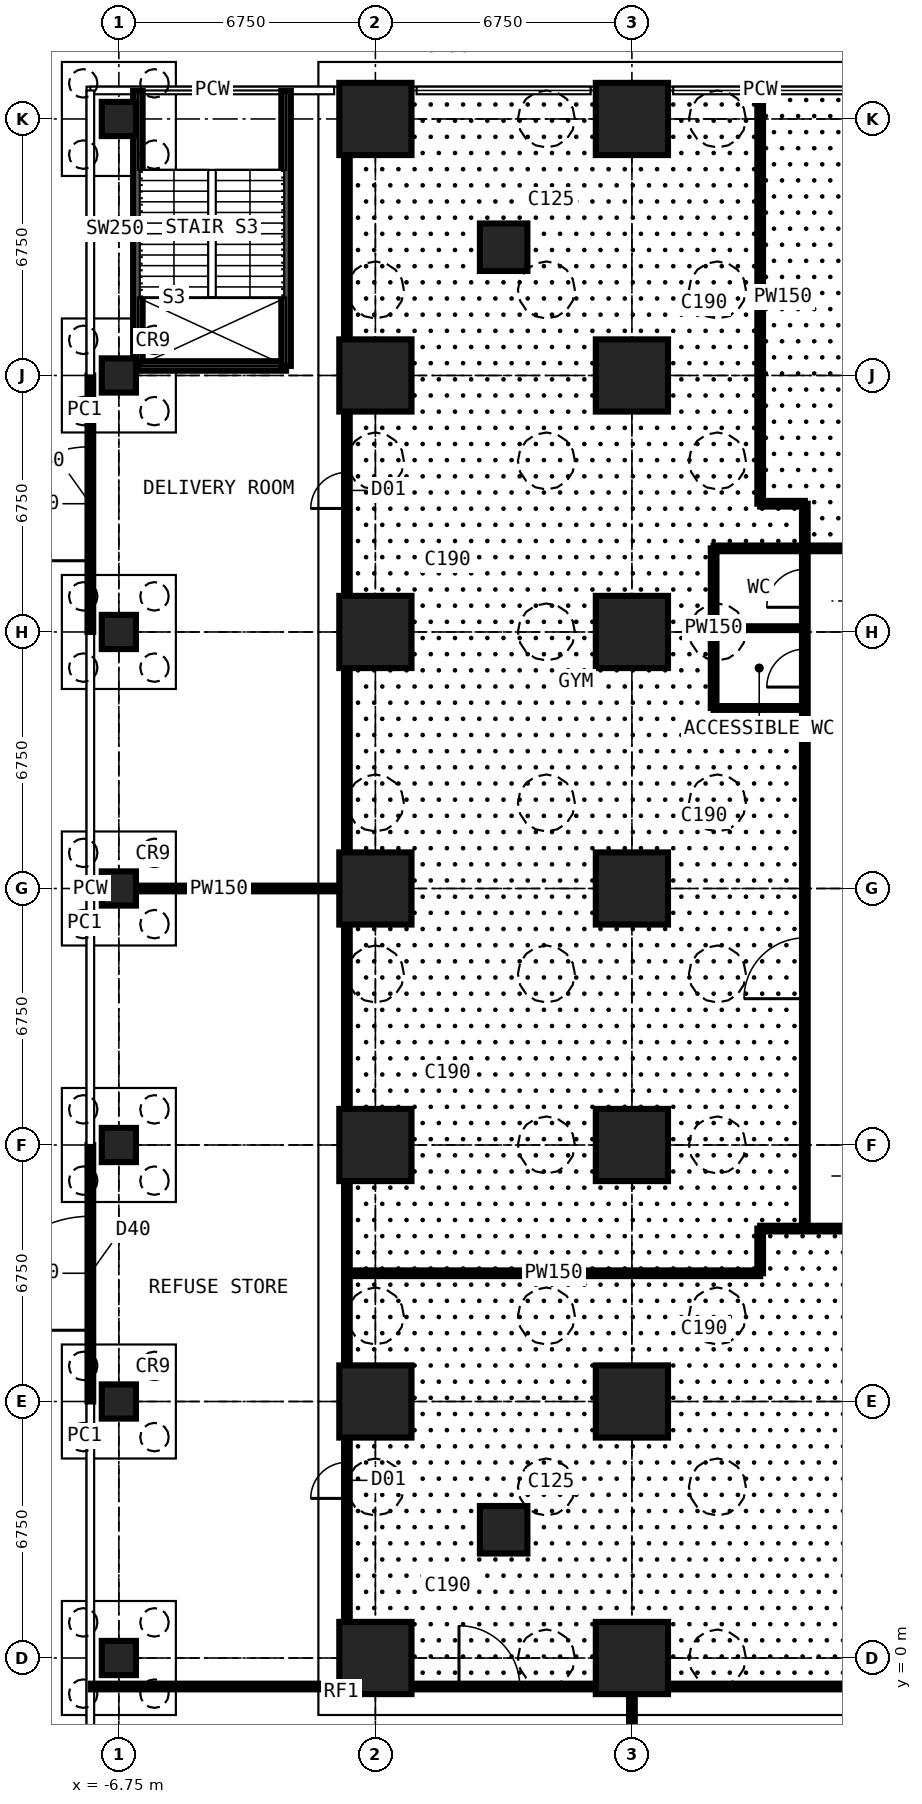
"""IFC4 building model, lengths in metres.
Left out: names, types, materials, properties, quantities, classifications, styles, units other than length and angle.
Written with IfcOpenShell. Run it as: python <this file> out.ifc"""

import sys

from ifc_helpers import new_model, si_unit, direction, frame, frame_2d, origin, origin_2d, place, context, subcontext, project, spatial, rectangle, circle, extrude, element, fill, save


model = new_model("IFC4")
c1 = context("Model", 3, precision=1e-05, world=origin(), true_north=direction((0.0, 1.0)))
c2 = subcontext(c1, "Body", "Model", "MODEL_VIEW")
j1 = project(units=[si_unit("LENGTHUNIT", "METRE"), si_unit("PLANEANGLEUNIT", "RADIAN")], contexts=[c1])
p1 = place(None, origin())
s1 = spatial("IfcSite", under=j1, at=p1, CompositionType="ELEMENT")
p2 = place(p1, origin())
s2 = spatial("IfcBuilding", under=s1, at=p2, CompositionType="ELEMENT")
p3 = place(p2, origin())
s3 = spatial("IfcBuildingStorey", under=s2, at=p3, CompositionType="ELEMENT", Elevation=0.0)
for number, where, z_axis, x_axis in (
    (1, (-6.75, 0.0, 0.0), (0.0, 0.0, 1.0), (1.0, 0.0, 0.0)),
    (2, (-6.75, 6.75, 0.0), (0.0, 0.0, 1.0), (1.0, 0.0, 0.0)),
    (3, (-6.75, 13.5, 0.0), (0.0, 0.0, 1.0), (1.0, 0.0, 0.0)),
    (4, (-6.75, 20.25, 0.0), (0.0, 0.0, 1.0), (1.0, 0.0, 0.0)),
    (5, (-6.75, 27.0, 0.0), (0.0, 0.0, 1.0), (1.0, 0.0, 0.0)),
    (6, (-6.75, 33.75, 0.0), (0.0, 0.0, 1.0), (1.0, 0.0, 0.0)),
    (7, (-6.75, 40.5, 0.0), (0.0, 0.0, 1.0), (1.0, 0.0, 0.0)),
):
    element("IfcColumn", number, at=place(p3, frame(where, z_axis=z_axis, x_axis=x_axis)), inside=s3, PredefinedType="COLUMN", context=c2, shape_type="SweptSolid", body=[
        extrude(circle(Radius=0.45, at=origin_2d()), origin(), (0.0, 0.0, 1.0), 4.5),
    ])
for number, where, z_axis, x_axis in (
    (8, (0.0, 0.0, 0.0), (0.0, 0.0, 1.0), (1.0, 0.0, 0.0)),
    (9, (0.0, 6.75, 0.0), (0.0, 0.0, 1.0), (1.0, 0.0, 0.0)),
    (10, (0.0, 13.5, 0.0), (0.0, 0.0, 1.0), (1.0, 0.0, 0.0)),
    (11, (0.0, 20.25, 0.0), (0.0, 0.0, 1.0), (1.0, 0.0, 0.0)),
    (12, (0.0, 27.0, 0.0), (0.0, 0.0, 1.0), (1.0, 0.0, 0.0)),
    (13, (0.0, 33.75, 0.0), (0.0, 0.0, 1.0), (1.0, 0.0, 0.0)),
    (14, (0.0, 40.5, 0.0), (0.0, 0.0, 1.0), (1.0, 0.0, 0.0)),
):
    element("IfcColumn", number, at=place(p3, frame(where, z_axis=z_axis, x_axis=x_axis)), inside=s3, PredefinedType="COLUMN", context=c2, shape_type="SweptSolid", body=[
        extrude(rectangle(XDim=1.9, YDim=1.9, at=origin_2d()), origin(), (0.0, 0.0, 1.0), 4.5),
    ])
for number, where, z_axis, x_axis in (
    (15, (3.375, 3.375, 0.0), (0.0, 0.0, 1.0), (1.0, 0.0, 0.0)),
    (16, (3.375, 37.125, 0.0), (0.0, 0.0, 1.0), (1.0, 0.0, 0.0)),
):
    element("IfcColumn", number, at=place(p3, frame(where, z_axis=z_axis, x_axis=x_axis)), inside=s3, PredefinedType="COLUMN", context=c2, shape_type="SweptSolid", body=[
        extrude(rectangle(XDim=1.25, YDim=1.25, at=origin_2d()), origin(), (0.0, 0.0, 1.0), 4.5),
    ])
for number, where, z_axis, x_axis in (
    (17, (6.75, 0.0, 0.0), (0.0, 0.0, 1.0), (1.0, 0.0, 0.0)),
    (18, (6.75, 6.75, 0.0), (0.0, 0.0, 1.0), (1.0, 0.0, 0.0)),
    (19, (6.75, 13.5, 0.0), (0.0, 0.0, 1.0), (1.0, 0.0, 0.0)),
    (20, (6.75, 20.25, 0.0), (0.0, 0.0, 1.0), (1.0, 0.0, 0.0)),
    (21, (6.75, 27.0, 0.0), (0.0, 0.0, 1.0), (1.0, 0.0, 0.0)),
    (22, (6.75, 33.75, 0.0), (0.0, 0.0, 1.0), (1.0, 0.0, 0.0)),
    (23, (6.75, 40.5, 0.0), (0.0, 0.0, 1.0), (1.0, 0.0, 0.0)),
):
    element("IfcColumn", number, at=place(p3, frame(where, z_axis=z_axis, x_axis=x_axis)), inside=s3, PredefinedType="COLUMN", context=c2, shape_type="SweptSolid", body=[
        extrude(rectangle(XDim=1.9, YDim=1.9, at=origin_2d()), origin(), (0.0, 0.0, 1.0), 4.5),
    ])
p4 = place(p3, frame((-7.5, 6.75, 0.0), z_axis=(0.0, 0.0, 1.0), x_axis=(0.0, 1.0, 0.0)))
e24 = element("IfcWall", 24, at=p4, inside=s3, PredefinedType="SOLIDWALL", context=c2, shape_type="SweptSolid", body=[
    extrude(rectangle(XDim=6.75, YDim=0.15, at=frame_2d((3.375, 0.0))), origin(), (0.0, 0.0, 1.0), 4.25),
])
p5 = place(p4, frame((1.875, 0.0, 0.0)))
e25 = element("IfcOpeningElement", 25, at=p5, cuts=e24, PredefinedType="OPENING", context=c2, shape_type="SweptSolid", body=[
    extrude(rectangle(XDim=3.0, YDim=3.0, at=frame_2d((1.5, 1.5))), frame((0.0, 0.085, 0.0), z_axis=(0.0, -1.0, 0.0), x_axis=(1.0, 0.0, 0.0)), (0.0, 0.0, 1.0), 0.17),
])
p6 = place(p3, frame((-7.5, 27.0, 0.0), z_axis=(0.0, 0.0, 1.0), x_axis=(0.0, 1.0, 0.0)))
e26 = element("IfcWall", 26, at=p6, inside=s3, PredefinedType="SOLIDWALL", context=c2, shape_type="SweptSolid", body=[
    extrude(rectangle(XDim=6.75, YDim=0.15, at=frame_2d((3.375, 0.0))), origin(), (0.0, 0.0, 1.0), 4.25),
])
p7 = place(p6, frame((1.875, 0.0, 0.0)))
e27 = element("IfcOpeningElement", 27, at=p7, cuts=e26, PredefinedType="OPENING", context=c2, shape_type="SweptSolid", body=[
    extrude(rectangle(XDim=3.0, YDim=3.0, at=frame_2d((1.5, 1.5))), frame((0.0, 0.085, 0.0), z_axis=(0.0, -1.0, 0.0), x_axis=(1.0, 0.0, 0.0)), (0.0, 0.0, 1.0), 0.17),
])
p8 = place(p3, frame((-7.484, -0.75, 0.0), z_axis=(0.0, 0.0, 1.0), x_axis=(1.0, 0.0, 0.0)))
e28 = element("IfcWall", 28, at=p8, inside=s3, PredefinedType="PARTITIONING", context=c2, shape_type="SweptSolid", body=[
    extrude(rectangle(XDim=20.984, YDim=0.15, at=frame_2d((10.492, 0.0))), origin(), (0.0, 0.0, 1.0), 4.25),
])
p9 = place(p8, frame((9.684, 0.0, 0.0)))
e29 = element("IfcOpeningElement", 29, at=p9, cuts=e28, PredefinedType="OPENING", context=c2, shape_type="SweptSolid", body=[
    extrude(rectangle(XDim=1.6, YDim=2.4, at=frame_2d((0.8, 1.2))), frame((0.0, 0.085, 0.0), z_axis=(0.0, -1.0, 0.0), x_axis=(1.0, 0.0, 0.0)), (0.0, 0.0, 1.0), 0.17),
])
p10 = place(p3, frame((-7.484, 20.25, 0.0), z_axis=(0.0, 0.0, 1.0), x_axis=(1.0, 0.0, 0.0)))
e30 = element("IfcWall", 30, at=p10, inside=s3, PredefinedType="PARTITIONING", context=c2, shape_type="SweptSolid", body=[
    extrude(rectangle(XDim=6.734, YDim=0.15, at=frame_2d((3.367, 0.0))), origin(), (0.0, 0.0, 1.0), 3.752),
])
p11 = place(p3, frame((-6.25, 34.0, 0.0), z_axis=(0.0, 0.0, 1.0), x_axis=(0.0, 1.0, 0.0)))
e31 = element("IfcWall", 31, at=p11, inside=s3, PredefinedType="SOLIDWALL", context=c2, shape_type="SweptSolid", body=[
    extrude(rectangle(XDim=7.234, YDim=0.25, at=frame_2d((3.617, 0.0))), origin(), (0.0, 0.0, 1.0), 4.25),
])
p12 = place(p3, frame((-6.25, 34.0, 0.0), z_axis=(0.0, 0.0, 1.0), x_axis=(1.0, 0.0, 0.0)))
e32 = element("IfcWall", 32, at=p12, inside=s3, PredefinedType="SOLIDWALL", context=c2, shape_type="SweptSolid", body=[
    extrude(rectangle(XDim=3.9, YDim=0.25, at=frame_2d((1.95, 0.0))), origin(), (0.0, 0.0, 1.0), 4.25),
])
p13 = place(p3, frame((-2.35, 34.0, 0.0), z_axis=(0.0, 0.0, 1.0), x_axis=(0.0, 1.0, 0.0)))
e33 = element("IfcWall", 33, at=p13, inside=s3, PredefinedType="SOLIDWALL", context=c2, shape_type="SweptSolid", body=[
    extrude(rectangle(XDim=7.234, YDim=0.25, at=frame_2d((3.617, 0.0))), origin(), (0.0, 0.0, 1.0), 4.25),
])
p14 = place(p3, frame((-0.75, -0.75, 0.0), z_axis=(0.0, 0.0, 1.0), x_axis=(0.0, 1.0, 0.0)))
e34 = element("IfcWall", 34, at=p14, inside=s3, PredefinedType="PARTITIONING", context=c2, shape_type="SweptSolid", body=[
    extrude(rectangle(XDim=41.984, YDim=0.15, at=frame_2d((20.992, 0.0))), origin(), (0.0, 0.0, 1.0), 4.25),
])
p15 = place(p14, frame((4.95, 0.0, 0.0)))
e35 = element("IfcOpeningElement", 35, at=p15, cuts=e34, PredefinedType="OPENING", context=c2, shape_type="SweptSolid", body=[
    extrude(rectangle(XDim=0.95, YDim=2.2, at=frame_2d((0.475, 1.1))), frame((0.0, 0.085, 0.0), z_axis=(0.0, -1.0, 0.0), x_axis=(1.0, 0.0, 0.0)), (0.0, 0.0, 1.0), 0.17),
])
p16 = place(p14, frame((31.0, 0.0, 0.0)))
e36 = element("IfcOpeningElement", 36, at=p16, cuts=e34, PredefinedType="OPENING", context=c2, shape_type="SweptSolid", body=[
    extrude(rectangle(XDim=0.95, YDim=2.2, at=frame_2d((0.475, 1.1))), frame((0.0, 0.085, 0.0), z_axis=(0.0, -1.0, 0.0), x_axis=(1.0, 0.0, 0.0)), (0.0, 0.0, 1.0), 0.17),
])
p17 = place(p3, frame((-0.75, 10.125, 0.0), z_axis=(0.0, 0.0, 1.0), x_axis=(1.0, 0.0, 0.0)))
e37 = element("IfcWall", 37, at=p17, inside=s3, PredefinedType="PARTITIONING", context=c2, shape_type="SweptSolid", body=[
    extrude(rectangle(XDim=10.875, YDim=0.15, at=frame_2d((5.438, 0.0))), origin(), (0.0, 0.0, 1.0), 4.25),
])
p18 = place(p3, frame((6.75, -7.6, 0.0), z_axis=(0.0, 0.0, 1.0), x_axis=(0.0, 1.0, 0.0)))
e38 = element("IfcWall", 38, at=p18, inside=s3, PredefinedType="PARTITIONING", context=c2, shape_type="SweptSolid", body=[
    extrude(rectangle(XDim=6.85, YDim=0.15, at=frame_2d((3.425, 0.0))), origin(), (0.0, 0.0, 1.0), 3.752),
])
p19 = place(p3, frame((8.9, 25.0, 0.0), z_axis=(0.0, 0.0, 1.0), x_axis=(0.0, 1.0, 0.0)))
e39 = element("IfcWall", 39, at=p19, inside=s3, PredefinedType="PARTITIONING", context=c2, shape_type="SweptSolid", body=[
    extrude(rectangle(XDim=4.2, YDim=0.15, at=frame_2d((2.1, 0.0))), origin(), (0.0, 0.0, 1.0), 4.25),
])
p20 = place(p3, frame((8.9, 25.0, 0.0), z_axis=(0.0, 0.0, 1.0), x_axis=(1.0, 0.0, 0.0)))
e40 = element("IfcWall", 40, at=p20, inside=s3, PredefinedType="PARTITIONING", context=c2, shape_type="SweptSolid", body=[
    extrude(rectangle(XDim=2.4, YDim=0.1, at=frame_2d((1.2, 0.0))), origin(), (0.0, 0.0, 1.0), 4.25),
])
p21 = place(p3, frame((8.9, 27.1, 0.0), z_axis=(0.0, 0.0, 1.0), x_axis=(1.0, 0.0, 0.0)))
e41 = element("IfcWall", 41, at=p21, inside=s3, PredefinedType="PARTITIONING", context=c2, shape_type="SweptSolid", body=[
    extrude(rectangle(XDim=2.4, YDim=0.1, at=frame_2d((1.2, 0.0))), origin(), (0.0, 0.0, 1.0), 3.752),
])
p22 = place(p3, frame((8.9, 29.2, 0.0), z_axis=(0.0, 0.0, 1.0), x_axis=(1.0, 0.0, 0.0)))
e42 = element("IfcWall", 42, at=p22, inside=s3, PredefinedType="PARTITIONING", context=c2, shape_type="SweptSolid", body=[
    extrude(rectangle(XDim=21.475, YDim=0.15, at=frame_2d((10.738, 0.0))), origin(), (0.0, 0.0, 1.0), 4.25),
])
p23 = place(p22, frame((10.55, 0.0, 0.0)))
e43 = element("IfcOpeningElement", 43, at=p23, cuts=e42, PredefinedType="OPENING", context=c2, shape_type="SweptSolid", body=[
    extrude(rectangle(XDim=1.6, YDim=2.4, at=frame_2d((0.8, 1.2))), frame((0.0, 0.085, 0.0), z_axis=(0.0, -1.0, 0.0), x_axis=(1.0, 0.0, 0.0)), (0.0, 0.0, 1.0), 0.17),
])
p24 = place(p3, frame((10.125, 10.125, 0.0), z_axis=(0.0, 0.0, 1.0), x_axis=(0.0, 1.0, 0.0)))
e44 = element("IfcWall", 44, at=p24, inside=s3, PredefinedType="PARTITIONING", context=c2, shape_type="SweptSolid", body=[
    extrude(rectangle(XDim=1.175, YDim=0.15, at=frame_2d((0.587, 0.0))), origin(), (0.0, 0.0, 1.0), 4.25),
])
p25 = place(p3, frame((10.125, 11.3, 0.0), z_axis=(0.0, 0.0, 1.0), x_axis=(1.0, 0.0, 0.0)))
e45 = element("IfcWall", 45, at=p25, inside=s3, PredefinedType="PARTITIONING", context=c2, shape_type="SweptSolid", body=[
    extrude(rectangle(XDim=20.675, YDim=0.15, at=frame_2d((10.337, 0.0))), origin(), (0.0, 0.0, 1.0), 4.25),
])
p26 = place(p25, frame((9.325, 0.0, 0.0)))
e46 = element("IfcOpeningElement", 46, at=p26, cuts=e45, PredefinedType="OPENING", context=c2, shape_type="SweptSolid", body=[
    extrude(rectangle(XDim=1.6, YDim=2.4, at=frame_2d((0.8, 1.2))), frame((0.0, 0.085, 0.0), z_axis=(0.0, -1.0, 0.0), x_axis=(1.0, 0.0, 0.0)), (0.0, 0.0, 1.0), 0.17),
])
p27 = place(p3, frame((10.125, 30.375, 0.0), z_axis=(0.0, 0.0, 1.0), x_axis=(0.0, 1.0, 0.0)))
e47 = element("IfcWall", 47, at=p27, inside=s3, PredefinedType="PARTITIONING", context=c2, shape_type="SweptSolid", body=[
    extrude(rectangle(XDim=10.859, YDim=0.15, at=frame_2d((5.429, 0.0))), origin(), (0.0, 0.0, 1.0), 4.25),
])
p28 = place(p3, frame((10.125, 30.375, 0.0), z_axis=(0.0, 0.0, 1.0), x_axis=(1.0, 0.0, 0.0)))
e48 = element("IfcWall", 48, at=p28, inside=s3, PredefinedType="PARTITIONING", context=c2, shape_type="SweptSolid", body=[
    extrude(rectangle(XDim=1.175, YDim=0.15, at=frame_2d((0.587, 0.0))), origin(), (0.0, 0.0, 1.0), 4.25),
])
p29 = place(p3, frame((11.3, 11.3, 0.0), z_axis=(0.0, 0.0, 1.0), x_axis=(0.0, 1.0, 0.0)))
e49 = element("IfcWall", 49, at=p29, inside=s3, PredefinedType="PARTITIONING", context=c2, shape_type="SweptSolid", body=[
    extrude(rectangle(XDim=19.075, YDim=0.15, at=frame_2d((9.538, 0.0))), origin(), (0.0, 0.0, 1.0), 4.25),
])
p30 = place(p29, frame((14.25, 0.0, 0.0)))
e50 = element("IfcOpeningElement", 50, at=p30, cuts=e49, PredefinedType="OPENING", context=c2, shape_type="SweptSolid", body=[
    extrude(rectangle(XDim=1.0, YDim=2.2, at=frame_2d((0.5, 1.1))), frame((0.0, 0.085, 0.0), z_axis=(0.0, -1.0, 0.0), x_axis=(1.0, 0.0, 0.0)), (0.0, 0.0, 1.0), 0.17),
])
p31 = place(p29, frame((16.35, 0.0, 0.0)))
e51 = element("IfcOpeningElement", 51, at=p31, cuts=e49, PredefinedType="OPENING", context=c2, shape_type="SweptSolid", body=[
    extrude(rectangle(XDim=1.0, YDim=2.2, at=frame_2d((0.5, 1.1))), frame((0.0, 0.085, 0.0), z_axis=(0.0, -1.0, 0.0), x_axis=(1.0, 0.0, 0.0)), (0.0, 0.0, 1.0), 0.17),
])
p32 = place(p29, frame((6.05, 0.0, 0.0)))
e52 = element("IfcOpeningElement", 52, at=p32, cuts=e49, PredefinedType="OPENING", context=c2, shape_type="SweptSolid", body=[
    extrude(rectangle(XDim=1.6, YDim=2.4, at=frame_2d((0.8, 1.2))), frame((0.0, 0.085, 0.0), z_axis=(0.0, -1.0, 0.0), x_axis=(1.0, 0.0, 0.0)), (0.0, 0.0, 1.0), 0.17),
])
p33 = place(p5, origin())
e53 = element("IfcDoor", 53, at=p33, inside=s3, OperationType="ROLLINGUP", PredefinedType="DOOR", context=c2, shape_type="SweptSolid", body=[
    extrude(rectangle(XDim=3.0, YDim=3.0, at=frame_2d((1.5, 1.5))), frame((0.0, 0.025, 0.0), z_axis=(0.0, -1.0, 0.0), x_axis=(1.0, 0.0, 0.0)), (0.0, 0.0, 1.0), 0.05),
])
fill(e25, e53)
p34 = place(p7, origin())
e54 = element("IfcDoor", 54, at=p34, inside=s3, OperationType="ROLLINGUP", PredefinedType="DOOR", context=c2, shape_type="SweptSolid", body=[
    extrude(rectangle(XDim=3.0, YDim=3.0, at=frame_2d((1.5, 1.5))), frame((0.0, 0.025, 0.0), z_axis=(0.0, -1.0, 0.0), x_axis=(1.0, 0.0, 0.0)), (0.0, 0.0, 1.0), 0.05),
])
fill(e27, e54)
p35 = place(p30, origin())
e55 = element("IfcDoor", 55, at=p35, inside=s3, OperationType="SINGLE_SWING_LEFT", PredefinedType="DOOR", context=c2, shape_type="SweptSolid", body=[
    extrude(rectangle(XDim=1.0, YDim=2.2, at=frame_2d((0.5, 1.1))), frame((0.0, 0.025, 0.0), z_axis=(0.0, -1.0, 0.0), x_axis=(1.0, 0.0, 0.0)), (0.0, 0.0, 1.0), 0.05),
])
fill(e50, e55)
p36 = place(p31, origin())
e56 = element("IfcDoor", 56, at=p36, inside=s3, OperationType="SINGLE_SWING_LEFT", PredefinedType="DOOR", context=c2, shape_type="SweptSolid", body=[
    extrude(rectangle(XDim=1.0, YDim=2.2, at=frame_2d((0.5, 1.1))), frame((0.0, 0.025, 0.0), z_axis=(0.0, -1.0, 0.0), x_axis=(1.0, 0.0, 0.0)), (0.0, 0.0, 1.0), 0.05),
])
fill(e51, e56)
p37 = place(p32, origin())
e57 = element("IfcDoor", 57, at=p37, inside=s3, OperationType="DOUBLE_DOOR_SINGLE_SWING", PredefinedType="DOOR", context=c2, shape_type="SweptSolid", body=[
    extrude(rectangle(XDim=1.6, YDim=2.4, at=frame_2d((0.8, 1.2))), frame((0.0, 0.025, 0.0), z_axis=(0.0, -1.0, 0.0), x_axis=(1.0, 0.0, 0.0)), (0.0, 0.0, 1.0), 0.05),
])
fill(e52, e57)
p38 = place(p9, origin())
e58 = element("IfcDoor", 58, at=p38, inside=s3, OperationType="DOUBLE_DOOR_SINGLE_SWING", PredefinedType="DOOR", context=c2, shape_type="SweptSolid", body=[
    extrude(rectangle(XDim=1.6, YDim=2.4, at=frame_2d((0.8, 1.2))), frame((0.0, 0.025, 0.0), z_axis=(0.0, -1.0, 0.0), x_axis=(1.0, 0.0, 0.0)), (0.0, 0.0, 1.0), 0.05),
])
fill(e29, e58)
p39 = place(p15, origin())
e59 = element("IfcDoor", 59, at=p39, inside=s3, OperationType="SINGLE_SWING_LEFT", PredefinedType="DOOR", context=c2, shape_type="SweptSolid", body=[
    extrude(rectangle(XDim=0.95, YDim=2.2, at=frame_2d((0.475, 1.1))), frame((0.0, 0.025, 0.0), z_axis=(0.0, -1.0, 0.0), x_axis=(1.0, 0.0, 0.0)), (0.0, 0.0, 1.0), 0.05),
])
fill(e35, e59)
p40 = place(p16, origin())
e60 = element("IfcDoor", 60, at=p40, inside=s3, OperationType="SINGLE_SWING_LEFT", PredefinedType="DOOR", context=c2, shape_type="SweptSolid", body=[
    extrude(rectangle(XDim=0.95, YDim=2.2, at=frame_2d((0.475, 1.1))), frame((0.0, 0.025, 0.0), z_axis=(0.0, -1.0, 0.0), x_axis=(1.0, 0.0, 0.0)), (0.0, 0.0, 1.0), 0.05),
])
fill(e36, e60)
save(model, sys.argv[1])
